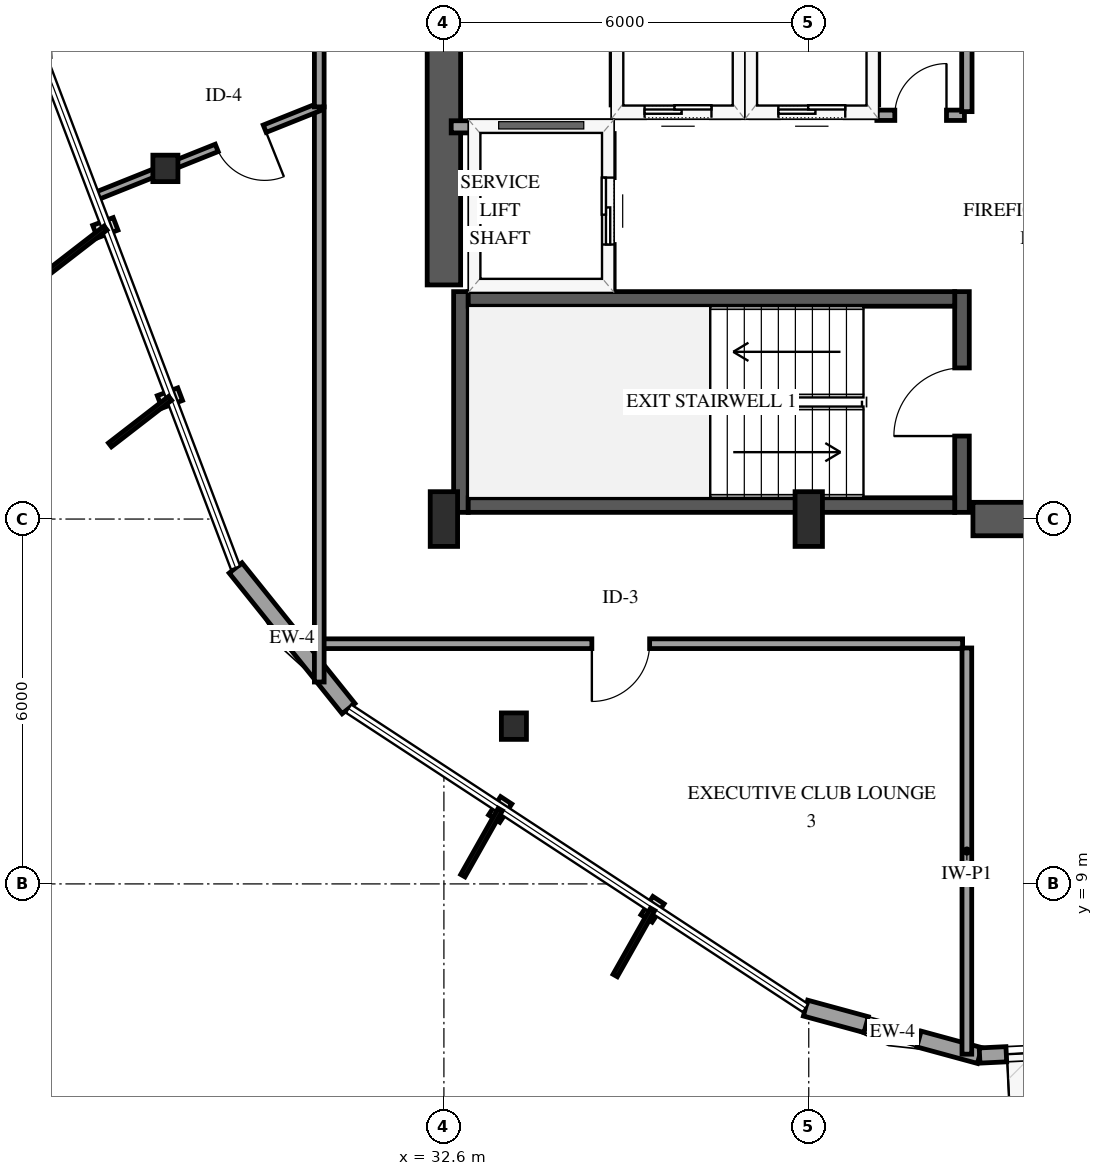
"""IFC4 building model, lengths in metres.
Left out: names, types, materials, properties, quantities, classifications, styles, units other than length and angle.
Written with IfcOpenShell. Run it as: python <this file> out.ifc"""

import sys

from ifc_helpers import new_model, si_unit, direction, frame, frame_2d, origin, origin_2d, place, context, subcontext, project, spatial, rectangle, i_section, extrude, element, fill, save


model = new_model("IFC4")
c1 = context("Model", 3, precision=1e-05, world=origin(), true_north=direction((0.0, 1.0)))
c2 = subcontext(c1, "Body", "Model", "MODEL_VIEW")
j1 = project(units=[si_unit("LENGTHUNIT", "METRE"), si_unit("PLANEANGLEUNIT", "RADIAN")], contexts=[c1])
p1 = place(None, origin())
s1 = spatial("IfcSite", under=j1, at=p1, CompositionType="ELEMENT")
p2 = place(p1, origin())
s2 = spatial("IfcBuilding", under=s1, at=p2, CompositionType="ELEMENT")
p3 = place(p2, frame((0.0, 0.0, 175.0)))
s3 = spatial("IfcBuildingStorey", under=s2, at=p3, CompositionType="ELEMENT", Elevation=175.0)
p4 = place(p3, frame((32.88, 15.11, 0.0), z_axis=(0.0, 0.0, 1.0), x_axis=(0.0, 1.0, 0.0)))
e1 = element("IfcWall", 1, at=p4, inside=s3, PredefinedType="SHEAR", context=c2, shape_type="SweptSolid", body=[
    extrude(rectangle(XDim=3.63, YDim=0.24, at=frame_2d((1.815, 0.0))), origin(), (0.0, 0.0, 1.0), 3.6),
])
p5 = place(p3, frame((41.12, 15.11, 0.0), z_axis=(0.0, 0.0, 1.0), x_axis=(0.0, 1.0, 0.0)))
e2 = element("IfcWall", 2, at=p5, inside=s3, PredefinedType="SHEAR", context=c2, shape_type="SweptSolid", body=[
    extrude(rectangle(XDim=3.63, YDim=0.24, at=frame_2d((1.815, 0.0))), origin(), (0.0, 0.0, 1.0), 3.6),
])
p6 = place(p5, frame((1.255, 0.0, 0.0)))
e3 = element("IfcOpeningElement", 3, at=p6, cuts=e2, PredefinedType="OPENING", context=c2, shape_type="SweptSolid", body=[
    extrude(rectangle(XDim=1.12, YDim=2.15, at=frame_2d((0.56, 1.075))), frame((0.0, 0.13, 0.0), z_axis=(0.0, -1.0, 0.0), x_axis=(1.0, 0.0, 0.0)), (0.0, 0.0, 1.0), 0.26),
])
for number, where, z_axis, x_axis in (
    (4, (33.0, 15.23, 0.0), (0.0, 0.0, 1.0), (1.0, 0.0, 0.0)),
    (5, (33.0, 18.62, 0.0), (0.0, 0.0, 1.0), (1.0, 0.0, 0.0)),
):
    element("IfcWall", number, at=place(p3, frame(where, z_axis=z_axis, x_axis=x_axis)), inside=s3, PredefinedType="SHEAR", context=c2, shape_type="SweptSolid", body=[
        extrude(rectangle(XDim=8.0, YDim=0.24, at=frame_2d((4.0, 0.0))), origin(), (0.0, 0.0, 1.0), 3.6),
    ])
p7 = place(p3, frame((32.6, 18.85, 0.0), z_axis=(0.0, 0.0, 1.0), x_axis=(0.0, 1.0, 0.0)))
e6 = element("IfcWall", 6, at=p7, inside=s3, PredefinedType="SHEAR", context=c2, shape_type="SweptSolid", body=[
    extrude(rectangle(XDim=12.3, YDim=0.55, at=frame_2d((6.15, 0.0))), origin(), (0.0, 0.0, 1.0), 3.6),
])
p8 = place(p3, frame((41.3, 15.0, 0.0), z_axis=(0.0, 0.0, 1.0), x_axis=(1.0, 0.0, 0.0)))
e7 = element("IfcWall", 7, at=p8, inside=s3, PredefinedType="SHEAR", context=c2, shape_type="SweptSolid", body=[
    extrude(rectangle(XDim=2.85, YDim=0.55, at=frame_2d((1.425, 0.0))), origin(), (0.0, 0.0, 1.0), 3.6),
])
for number, where, z_axis, x_axis in (
    (8, (32.6, 15.0, 0.0), (0.0, 0.0, 1.0), (1.0, 0.0, 0.0)),
    (9, (38.6, 15.0, 0.0), (0.0, 0.0, 1.0), (1.0, 0.0, 0.0)),
):
    element("IfcColumn", number, at=place(p3, frame(where, z_axis=z_axis, x_axis=x_axis)), inside=s3, PredefinedType="PILASTER", context=c2, shape_type="SweptSolid", body=[
        extrude(rectangle(XDim=0.45, YDim=0.9, at=origin_2d()), origin(), (0.0, 0.0, 1.0), 3.6),
    ])
for number, where, z_axis, x_axis in (
    (10, (28.02, 20.766, 0.0), (0.0, 0.0, 1.0), (1.0, 0.0, 0.0)),
    (11, (33.751, 11.594, 0.0), (0.0, 0.0, 1.0), (1.0, 0.0, 0.0)),
):
    element("IfcColumn", number, at=place(p3, frame(where, z_axis=z_axis, x_axis=x_axis)), inside=s3, PredefinedType="COLUMN", context=c2, shape_type="SweptSolid", body=[
        extrude(i_section(OverallWidth=0.412, OverallDepth=0.435, WebThickness=0.036, FlangeThickness=0.057, FilletRadius=0.038, at=origin_2d()), origin(), (0.0, 0.0, 1.0), 3.6),
    ])
p9 = place(p3, frame((29.174, 14.196, 0.0), z_axis=(0.0, 0.0, 1.0), x_axis=(0.626008855635, -0.779815947943, 0.0)))
e12 = element("IfcWall", 12, at=p9, inside=s3, PredefinedType="SOLIDWALL", context=c2, shape_type="SweptSolid", body=[
    extrude(rectangle(XDim=2.967, YDim=0.27, at=frame_2d((1.483, 0.0))), origin(), (0.0, 0.0, 1.0), 2.679),
])
p10 = place(p3, frame((38.547, 6.958, 0.0), z_axis=(0.0, 0.0, 1.0), x_axis=(0.964809388606, -0.262950268412, 0.0)))
e13 = element("IfcWall", 13, at=p10, inside=s3, PredefinedType="SOLIDWALL", context=c2, shape_type="SweptSolid", body=[
    extrude(rectangle(XDim=2.967, YDim=0.27, at=frame_2d((1.483, 0.0))), origin(), (0.0, 0.0, 1.0), 2.679),
])
p11 = place(p10, frame((1.033, 0.0, 0.75)))
e14 = element("IfcOpeningElement", 14, at=p11, cuts=e13, PredefinedType="OPENING", context=c2, shape_type="SweptSolid", body=[
    extrude(rectangle(XDim=0.9, YDim=1.5, at=frame_2d((0.45, 0.75))), frame((0.0, 0.145, 0.0), z_axis=(0.0, -1.0, 0.0), x_axis=(1.0, 0.0, 0.0)), (0.0, 0.0, 1.0), 0.29),
])
p12 = place(p3, frame((41.409, 6.177, 0.0), z_axis=(0.0, 0.0, 1.0), x_axis=(0.998839062629, 0.048171848272, 0.0)))
e15 = element("IfcWall", 15, at=p12, inside=s3, PredefinedType="SOLIDWALL", context=c2, shape_type="SweptSolid", body=[
    extrude(rectangle(XDim=8.986, YDim=0.25, at=frame_2d((4.493, 0.0))), origin(), (0.0, 0.0, 1.0), 2.679),
])
p13 = place(p12, frame((3.993, 0.0, 0.0)))
e16 = element("IfcOpeningElement", 16, at=p13, cuts=e15, PredefinedType="OPENING", context=c2, shape_type="SweptSolid", body=[
    extrude(rectangle(XDim=1.0, YDim=2.15, at=frame_2d((0.5, 1.075))), frame((0.0, 0.135, 0.0), z_axis=(0.0, -1.0, 0.0), x_axis=(1.0, 0.0, 0.0)), (0.0, 0.0, 1.0), 0.27),
])
p14 = place(p12, frame((0.44, 0.0, 0.72)))
e17 = element("IfcOpeningElement", 17, at=p14, cuts=e15, PredefinedType="OPENING", context=c2, shape_type="SweptSolid", body=[
    extrude(rectangle(XDim=1.05, YDim=1.55, at=frame_2d((0.525, 0.775))), frame((0.0, 0.135, 0.0), z_axis=(0.0, -1.0, 0.0), x_axis=(1.0, 0.0, 0.0)), (0.0, 0.0, 1.0), 0.27),
])
p15 = place(p12, frame((5.633, 0.0, 0.72)))
e18 = element("IfcOpeningElement", 18, at=p15, cuts=e15, PredefinedType="OPENING", context=c2, shape_type="SweptSolid", body=[
    extrude(rectangle(XDim=1.05, YDim=1.55, at=frame_2d((0.525, 0.775))), frame((0.0, 0.135, 0.0), z_axis=(0.0, -1.0, 0.0), x_axis=(1.0, 0.0, 0.0)), (0.0, 0.0, 1.0), 0.27),
])
p16 = place(p3, frame((35.45, 21.7, 0.0), z_axis=(0.0, 0.0, 1.0), x_axis=(1.0, 0.0, 0.0)))
e19 = element("IfcWall", 19, at=p16, inside=s3, PredefinedType="SOLIDWALL", context=c2, shape_type="SweptSolid", body=[
    extrude(rectangle(XDim=2.0, YDim=0.2, at=frame_2d((1.0, 0.0))), origin(), (0.0, 0.0, 1.0), 3.3),
])
p17 = place(p16, frame((0.45, 0.0, 0.0)))
e20 = element("IfcOpeningElement", 20, at=p17, cuts=e19, PredefinedType="OPENING", context=c2, shape_type="SweptSolid", body=[
    extrude(rectangle(XDim=1.1, YDim=2.15, at=frame_2d((0.55, 1.075))), frame((0.0, 0.11, 0.0), z_axis=(0.0, -1.0, 0.0), x_axis=(1.0, 0.0, 0.0)), (0.0, 0.0, 1.0), 0.22),
])
for number, where, z_axis, x_axis in (
    (21, (35.45, 21.81, 0.0), (0.0, 0.0, 1.0), (0.0, 1.0, 0.0)),
    (22, (37.45, 21.81, 0.0), (0.0, 0.0, 1.0), (0.0, 1.0, 0.0)),
):
    element("IfcWall", number, at=place(p3, frame(where, z_axis=z_axis, x_axis=x_axis)), inside=s3, PredefinedType="SOLIDWALL", context=c2, shape_type="SweptSolid", body=[
        extrude(rectangle(XDim=2.38, YDim=0.2, at=frame_2d((1.19, 0.0))), origin(), (0.0, 0.0, 1.0), 3.3),
    ])
p18 = place(p3, frame((37.65, 21.7, 0.0), z_axis=(0.0, 0.0, 1.0), x_axis=(1.0, 0.0, 0.0)))
e23 = element("IfcWall", 23, at=p18, inside=s3, PredefinedType="SOLIDWALL", context=c2, shape_type="SweptSolid", body=[
    extrude(rectangle(XDim=2.0, YDim=0.2, at=frame_2d((1.0, 0.0))), origin(), (0.0, 0.0, 1.0), 3.3),
])
p19 = place(p18, frame((0.45, 0.0, 0.0)))
e24 = element("IfcOpeningElement", 24, at=p19, cuts=e23, PredefinedType="OPENING", context=c2, shape_type="SweptSolid", body=[
    extrude(rectangle(XDim=1.1, YDim=2.15, at=frame_2d((0.55, 1.075))), frame((0.0, 0.11, 0.0), z_axis=(0.0, -1.0, 0.0), x_axis=(1.0, 0.0, 0.0)), (0.0, 0.0, 1.0), 0.22),
])
p20 = place(p3, frame((39.65, 21.81, 0.0), z_axis=(0.0, 0.0, 1.0), x_axis=(0.0, 1.0, 0.0)))
e25 = element("IfcWall", 25, at=p20, inside=s3, PredefinedType="SOLIDWALL", context=c2, shape_type="SweptSolid", body=[
    extrude(rectangle(XDim=2.38, YDim=0.2, at=frame_2d((1.19, 0.0))), origin(), (0.0, 0.0, 1.0), 3.3),
])
p21 = place(p3, frame((32.72, 21.45, 0.0), z_axis=(0.0, 0.0, 1.0), x_axis=(1.0, 0.0, 0.0)))
e26 = element("IfcWall", 26, at=p21, inside=s3, PredefinedType="SOLIDWALL", context=c2, shape_type="SweptSolid", body=[
    extrude(rectangle(XDim=2.58, YDim=0.2, at=frame_2d((1.29, 0.0))), origin(), (0.0, 0.0, 1.0), 3.3),
])
p22 = place(p3, frame((35.3, 18.79, 0.0), z_axis=(0.0, 0.0, 1.0), x_axis=(0.0, 1.0, 0.0)))
e27 = element("IfcWall", 27, at=p22, inside=s3, PredefinedType="SOLIDWALL", context=c2, shape_type="SweptSolid", body=[
    extrude(rectangle(XDim=2.55, YDim=0.2, at=frame_2d((1.275, 0.0))), origin(), (0.0, 0.0, 1.0), 3.3),
])
p23 = place(p22, frame((0.725, 0.0, 0.0)))
e28 = element("IfcOpeningElement", 28, at=p23, cuts=e27, PredefinedType="OPENING", context=c2, shape_type="SweptSolid", body=[
    extrude(rectangle(XDim=1.1, YDim=2.15, at=frame_2d((0.55, 1.075))), frame((0.0, 0.11, 0.0), z_axis=(0.0, -1.0, 0.0), x_axis=(1.0, 0.0, 0.0)), (0.0, 0.0, 1.0), 0.22),
])
p24 = place(p3, frame((41.13, 12.95, 0.0), z_axis=(0.0, 0.0, 1.0), x_axis=(-1.0, 0.0, 0.0)))
e29 = element("IfcWall", 29, at=p24, inside=s3, PredefinedType="PARTITIONING", context=c2, shape_type="SweptSolid", body=[
    extrude(rectangle(XDim=11.243, YDim=0.16, at=frame_2d((5.622, 0.0))), origin(), (0.0, 0.0, 1.0), 3.3),
])
p25 = place(p24, frame((5.147, 0.0, 0.0)))
e30 = element("IfcOpeningElement", 30, at=p25, cuts=e29, PredefinedType="OPENING", context=c2, shape_type="SweptSolid", body=[
    extrude(rectangle(XDim=0.95, YDim=2.15, at=frame_2d((0.475, 1.075))), frame((0.0, 0.09, 0.0), z_axis=(0.0, -1.0, 0.0), x_axis=(1.0, 0.0, 0.0)), (0.0, 0.0, 1.0), 0.18),
])
p26 = place(p3, frame((30.55, 12.32, 0.0), z_axis=(0.0, 0.0, 1.0), x_axis=(0.0, 1.0, 0.0)))
e31 = element("IfcWall", 31, at=p26, inside=s3, PredefinedType="PARTITIONING", context=c2, shape_type="SweptSolid", body=[
    extrude(rectangle(XDim=9.458, YDim=0.16, at=frame_2d((4.729, 0.0))), origin(), (0.0, 0.0, 1.0), 3.3),
])
p27 = place(p3, frame((41.2, 6.2, 0.0), z_axis=(0.0, 0.0, 1.0), x_axis=(0.0, 1.0, 0.0)))
e32 = element("IfcWall", 32, at=p27, inside=s3, PredefinedType="PARTITIONING", context=c2, shape_type="SweptSolid", body=[
    extrude(rectangle(XDim=6.68, YDim=0.16, at=frame_2d((3.34, 0.0))), origin(), (0.0, 0.0, 1.0), 2.678),
])
p28 = place(p3, frame((30.55, 21.778, 0.0), z_axis=(0.0, 0.0, 1.0), x_axis=(-0.928468217401, -0.371411859363, 0.0)))
e33 = element("IfcWall", 33, at=p28, inside=s3, PredefinedType="PARTITIONING", context=c2, shape_type="SweptSolid", body=[
    extrude(rectangle(XDim=3.974, YDim=0.13, at=frame_2d((1.987, 0.0))), origin(), (0.0, 0.0, 1.0), 3.3),
])
p29 = place(p28, frame((0.966, 0.0, 0.0)))
e34 = element("IfcOpeningElement", 34, at=p29, cuts=e33, PredefinedType="OPENING", context=c2, shape_type="SweptSolid", body=[
    extrude(rectangle(XDim=0.85, YDim=2.1, at=frame_2d((0.425, 1.05))), frame((0.0, 0.075, 0.0), z_axis=(0.0, -1.0, 0.0), x_axis=(1.0, 0.0, 0.0)), (0.0, 0.0, 1.0), 0.15),
])
p30 = place(p3, frame((39.72, 21.64, 0.0), z_axis=(0.0, 0.0, 1.0), x_axis=(1.0, 0.0, 0.0)))
e35 = element("IfcWall", 35, at=p30, inside=s3, PredefinedType="PARTITIONING", context=c2, shape_type="SweptSolid", body=[
    extrude(rectangle(XDim=1.44, YDim=0.17, at=frame_2d((0.72, 0.0))), origin(), (0.0, 0.0, 1.0), 3.3),
])
p31 = place(p30, frame((0.295, 0.0, 0.0)))
e36 = element("IfcOpeningElement", 36, at=p31, cuts=e35, PredefinedType="OPENING", context=c2, shape_type="SweptSolid", body=[
    extrude(rectangle(XDim=0.85, YDim=2.1, at=frame_2d((0.425, 1.05))), frame((0.0, 0.095, 0.0), z_axis=(0.0, -1.0, 0.0), x_axis=(1.0, 0.0, 0.0)), (0.0, 0.0, 1.0), 0.19),
])
p32 = place(p3, frame((41.2, 21.7, 0.0), z_axis=(0.0, 0.0, 1.0), x_axis=(0.0, 1.0, 0.0)))
e37 = element("IfcWall", 37, at=p32, inside=s3, PredefinedType="PARTITIONING", context=c2, shape_type="SweptSolid", body=[
    extrude(rectangle(XDim=1.12, YDim=0.17, at=frame_2d((0.56, 0.0))), origin(), (0.0, 0.0, 1.0), 3.3),
])
p33 = place(p3, frame((30.55, 21.778, 0.0), z_axis=(0.0, 0.0, 1.0), x_axis=(0.0, 1.0, 0.0)))
e38 = element("IfcWall", 38, at=p33, inside=s3, PredefinedType="PARTITIONING", context=c2, shape_type="SweptSolid", body=[
    extrude(rectangle(XDim=8.555, YDim=0.16, at=frame_2d((4.277, 0.0))), origin(), (0.0, 0.0, 1.0), 3.3),
])
p34 = place(p11, origin())
e39 = element("IfcWindow", 39, at=p34, inside=s3, PartitioningType="SINGLE_PANEL", PredefinedType="WINDOW", context=c2, shape_type="SweptSolid", body=[
    extrude(rectangle(XDim=0.9, YDim=1.5, at=frame_2d((0.45, 0.75))), frame((0.0, 0.03, 0.0), z_axis=(0.0, -1.0, 0.0), x_axis=(1.0, 0.0, 0.0)), (0.0, 0.0, 1.0), 0.06),
])
fill(e14, e39)
p35 = place(p14, origin())
e40 = element("IfcWindow", 40, at=p35, inside=s3, PartitioningType="SINGLE_PANEL", PredefinedType="WINDOW", context=c2, shape_type="SweptSolid", body=[
    extrude(rectangle(XDim=1.05, YDim=1.55, at=frame_2d((0.525, 0.775))), frame((0.0, 0.03, 0.0), z_axis=(0.0, -1.0, 0.0), x_axis=(1.0, 0.0, 0.0)), (0.0, 0.0, 1.0), 0.06),
])
fill(e17, e40)
p36 = place(p17, origin())
e41 = element("IfcDoor", 41, at=p36, inside=s3, OperationType="SLIDING_TO_LEFT", PredefinedType="DOOR", context=c2, shape_type="SweptSolid", body=[
    extrude(rectangle(XDim=1.1, YDim=2.15, at=frame_2d((0.55, 1.075))), frame((0.0, 0.025, 0.0), z_axis=(0.0, -1.0, 0.0), x_axis=(1.0, 0.0, 0.0)), (0.0, 0.0, 1.0), 0.05),
])
fill(e20, e41)
p37 = place(p19, origin())
e42 = element("IfcDoor", 42, at=p37, inside=s3, OperationType="SLIDING_TO_LEFT", PredefinedType="DOOR", context=c2, shape_type="SweptSolid", body=[
    extrude(rectangle(XDim=1.1, YDim=2.15, at=frame_2d((0.55, 1.075))), frame((0.0, 0.025, 0.0), z_axis=(0.0, -1.0, 0.0), x_axis=(1.0, 0.0, 0.0)), (0.0, 0.0, 1.0), 0.05),
])
fill(e24, e42)
p38 = place(p23, origin())
e43 = element("IfcDoor", 43, at=p38, inside=s3, OperationType="SLIDING_TO_LEFT", PredefinedType="DOOR", context=c2, shape_type="SweptSolid", body=[
    extrude(rectangle(XDim=1.1, YDim=2.15, at=frame_2d((0.55, 1.075))), frame((0.0, 0.025, 0.0), z_axis=(0.0, -1.0, 0.0), x_axis=(1.0, 0.0, 0.0)), (0.0, 0.0, 1.0), 0.05),
])
fill(e28, e43)
p39 = place(p6, origin())
e44 = element("IfcDoor", 44, at=p39, inside=s3, OperationType="SINGLE_SWING_LEFT", PredefinedType="DOOR", context=c2, shape_type="SweptSolid", body=[
    extrude(rectangle(XDim=1.12, YDim=2.15, at=frame_2d((0.56, 1.075))), frame((0.0, 0.025, 0.0), z_axis=(0.0, -1.0, 0.0), x_axis=(1.0, 0.0, 0.0)), (0.0, 0.0, 1.0), 0.05),
])
fill(e3, e44)
p40 = place(p25, origin())
e45 = element("IfcDoor", 45, at=p40, inside=s3, OperationType="SINGLE_SWING_RIGHT", PredefinedType="DOOR", context=c2, shape_type="SweptSolid", body=[
    extrude(rectangle(XDim=0.95, YDim=2.15, at=frame_2d((0.475, 1.075))), frame((0.0, 0.025, 0.0), z_axis=(0.0, -1.0, 0.0), x_axis=(1.0, 0.0, 0.0)), (0.0, 0.0, 1.0), 0.05),
])
fill(e30, e45)
p41 = place(p29, origin())
e46 = element("IfcDoor", 46, at=p41, inside=s3, OperationType="SINGLE_SWING_LEFT", PredefinedType="DOOR", context=c2, shape_type="SweptSolid", body=[
    extrude(rectangle(XDim=0.85, YDim=2.1, at=frame_2d((0.425, 1.05))), frame((0.0, 0.025, 0.0), z_axis=(0.0, -1.0, 0.0), x_axis=(1.0, 0.0, 0.0)), (0.0, 0.0, 1.0), 0.05),
])
fill(e34, e46)
p42 = place(p31, origin())
e47 = element("IfcDoor", 47, at=p42, inside=s3, OperationType="SINGLE_SWING_RIGHT", PredefinedType="DOOR", context=c2, shape_type="SweptSolid", body=[
    extrude(rectangle(XDim=0.85, YDim=2.1, at=frame_2d((0.425, 1.05))), frame((0.0, 0.025, 0.0), z_axis=(0.0, -1.0, 0.0), x_axis=(1.0, 0.0, 0.0)), (0.0, 0.0, 1.0), 0.05),
])
fill(e36, e47)
save(model, sys.argv[1])
